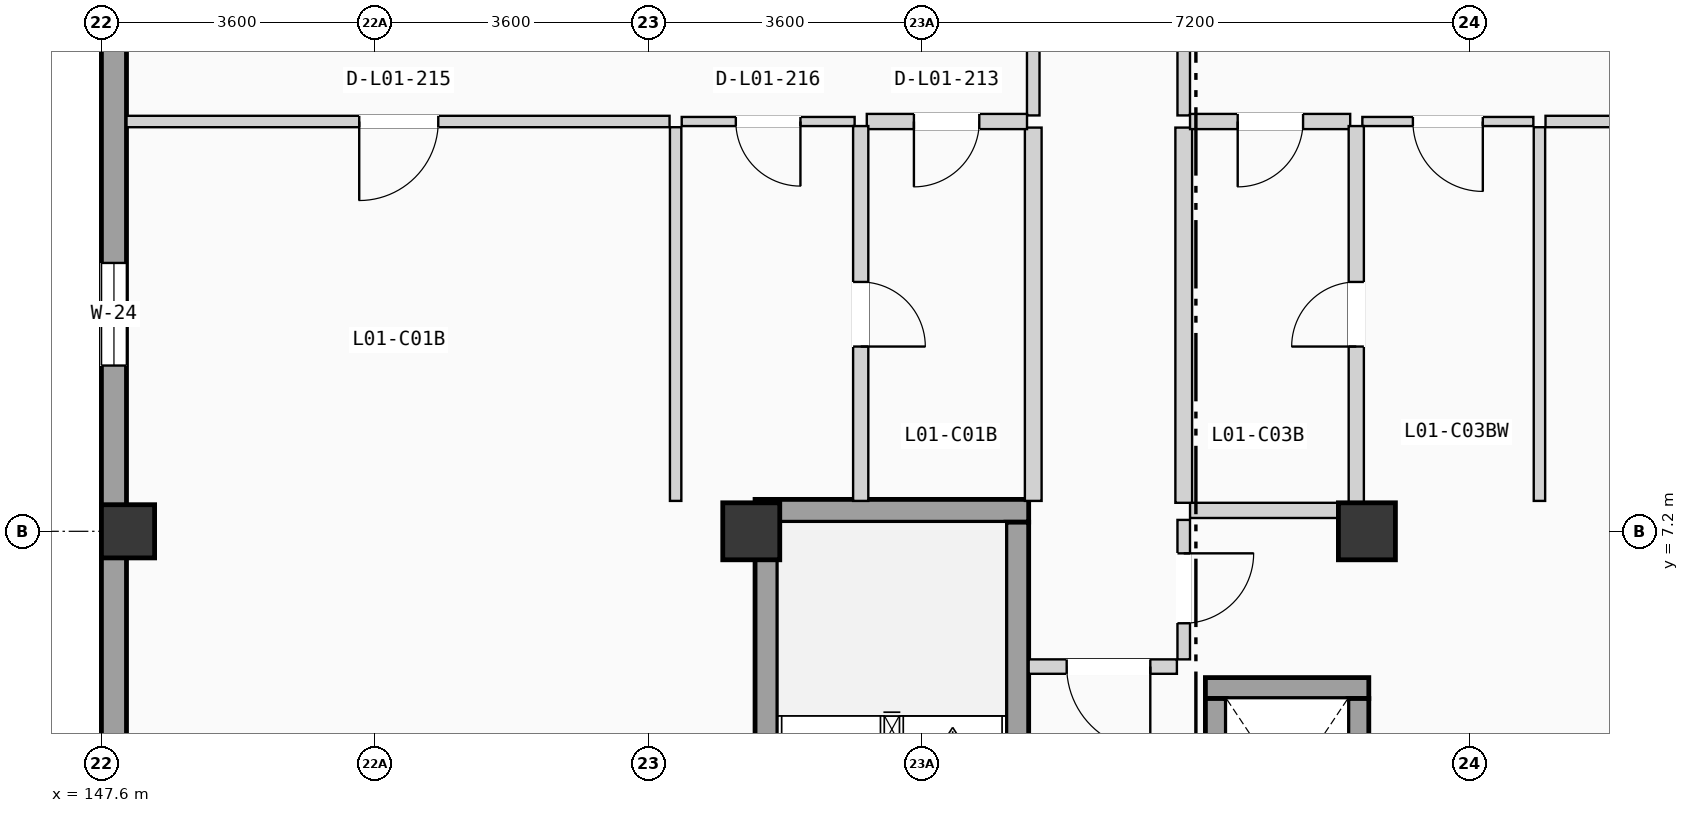
"""IFC4 building model, lengths in metres.
Left out: names, types, materials, properties, quantities, classifications, styles, units other than length and angle.
Written with IfcOpenShell. Run it as: python <this file> out.ifc"""

import sys

from ifc_helpers import new_model, si_unit, direction, frame, frame_2d, origin, origin_2d, place, context, subcontext, project, spatial, rectangle, extrude, element, fill, save


model = new_model("IFC4")
c1 = context("Model", 3, precision=1e-05, world=origin(), true_north=direction((0.0, 1.0)))
c2 = subcontext(c1, "Body", "Model", "MODEL_VIEW")
j1 = project(units=[si_unit("LENGTHUNIT", "METRE"), si_unit("PLANEANGLEUNIT", "RADIAN")], contexts=[c1])
p1 = place(None, origin())
s1 = spatial("IfcSite", under=j1, at=p1, CompositionType="ELEMENT")
p2 = place(p1, origin())
s2 = spatial("IfcBuilding", under=s1, at=p2, CompositionType="ELEMENT")
p3 = place(p2, frame((0.0, 0.0, 4.9)))
s3 = spatial("IfcBuildingStorey", under=s2, at=p3, CompositionType="ELEMENT", Elevation=4.9)
p4 = place(p3, frame((147.95, 7.2, 0.0), z_axis=(0.0, 0.0, 1.0), x_axis=(1.0, 0.0, 0.0)))
e1 = element("IfcColumn", 1, at=p4, inside=s3, PredefinedType="COLUMN", context=c2, shape_type="SweptSolid", body=[
    extrude(rectangle(XDim=0.7, YDim=0.7, at=origin_2d()), origin(), (0.0, 0.0, 1.0), 3.675),
])
for number, where, z_axis, x_axis in (
    (2, (156.15, 7.2, 0.0), (0.0, 0.0, 1.0), (1.0, 0.0, 0.0)),
    (3, (164.25, 7.2, 0.0), (0.0, 0.0, 1.0), (1.0, 0.0, 0.0)),
):
    element("IfcColumn", number, at=place(p3, frame(where, z_axis=z_axis, x_axis=x_axis)), inside=s3, PredefinedType="COLUMN", context=c2, shape_type="SweptSolid", body=[
        extrude(rectangle(XDim=0.75, YDim=0.75, at=origin_2d()), origin(), (0.0, 0.0, 1.0), 3.675),
    ])
p5 = place(p3, frame((147.765, 0.33, 0.0), z_axis=(0.0, 0.0, 1.0), x_axis=(0.0, 1.0, 0.0)))
e4 = element("IfcWall", 4, at=p5, inside=s3, PredefinedType="SOLIDWALL", context=c2, shape_type="SweptSolid", body=[
    extrude(rectangle(XDim=49.74, YDim=0.33, at=frame_2d((24.87, 0.0))), origin(), (0.0, 0.0, 1.0), 3.415),
])
p6 = place(p5, frame((15.645, 0.0, 0.9)))
e5 = element("IfcOpeningElement", 5, at=p6, cuts=e4, PredefinedType="OPENING", context=c2, shape_type="SweptSolid", body=[
    extrude(rectangle(XDim=1.35, YDim=1.5, at=frame_2d((0.675, 0.75))), frame((0.0, 0.175, 0.0), z_axis=(0.0, -1.0, 0.0), x_axis=(1.0, 0.0, 0.0)), (0.0, 0.0, 1.0), 0.35),
])
p7 = place(p5, frame((9.051, 0.0, 0.9)))
e6 = element("IfcOpeningElement", 6, at=p7, cuts=e4, PredefinedType="OPENING", context=c2, shape_type="SweptSolid", body=[
    extrude(rectangle(XDim=1.35, YDim=1.65, at=frame_2d((0.675, 0.825))), frame((0.0, 0.175, 0.0), z_axis=(0.0, -1.0, 0.0), x_axis=(1.0, 0.0, 0.0)), (0.0, 0.0, 1.0), 0.35),
])
p8 = place(p5, frame((19.055, 0.0, 0.9)))
e7 = element("IfcOpeningElement", 7, at=p8, cuts=e4, PredefinedType="OPENING", context=c2, shape_type="SweptSolid", body=[
    extrude(rectangle(XDim=1.35, YDim=1.8, at=frame_2d((0.675, 0.9))), frame((0.0, 0.175, 0.0), z_axis=(0.0, -1.0, 0.0), x_axis=(1.0, 0.0, 0.0)), (0.0, 0.0, 1.0), 0.35),
])
p9 = place(p5, frame((31.351, 0.0, 0.9)))
e8 = element("IfcOpeningElement", 8, at=p9, cuts=e4, PredefinedType="OPENING", context=c2, shape_type="SweptSolid", body=[
    extrude(rectangle(XDim=1.48, YDim=1.2, at=frame_2d((0.74, 0.6))), frame((0.0, 0.175, 0.0), z_axis=(0.0, -1.0, 0.0), x_axis=(1.0, 0.0, 0.0)), (0.0, 0.0, 1.0), 0.35),
])
p10 = place(p5, frame((25.136, 0.0, 0.9)))
e9 = element("IfcOpeningElement", 9, at=p10, cuts=e4, PredefinedType="OPENING", context=c2, shape_type="SweptSolid", body=[
    extrude(rectangle(XDim=1.48, YDim=1.35, at=frame_2d((0.74, 0.675))), frame((0.0, 0.175, 0.0), z_axis=(0.0, -1.0, 0.0), x_axis=(1.0, 0.0, 0.0)), (0.0, 0.0, 1.0), 0.35),
])
p11 = place(p5, frame((38.465, 0.0, 0.9)))
e10 = element("IfcOpeningElement", 10, at=p11, cuts=e4, PredefinedType="OPENING", context=c2, shape_type="SweptSolid", body=[
    extrude(rectangle(XDim=1.48, YDim=1.5, at=frame_2d((0.74, 0.75))), frame((0.0, 0.175, 0.0), z_axis=(0.0, -1.0, 0.0), x_axis=(1.0, 0.0, 0.0)), (0.0, 0.0, 1.0), 0.35),
])
p12 = place(p3, frame((156.2, 7.47, 0.0), z_axis=(0.0, 0.0, 1.0), x_axis=(1.0, 0.0, 0.0)))
e11 = element("IfcWall", 11, at=p12, inside=s3, PredefinedType="SHEAR", context=c2, shape_type="SweptSolid", body=[
    extrude(rectangle(XDim=3.6, YDim=0.3, at=frame_2d((1.8, 0.0))), origin(), (0.0, 0.0, 1.0), 3.415),
])
p13 = place(p3, frame((156.35, 0.32, 0.0), z_axis=(0.0, 0.0, 1.0), x_axis=(0.0, 1.0, 0.0)))
e12 = element("IfcWall", 12, at=p13, inside=s3, PredefinedType="SHEAR", context=c2, shape_type="SweptSolid", body=[
    extrude(rectangle(XDim=7.0, YDim=0.3, at=frame_2d((3.5, 0.0))), origin(), (0.0, 0.0, 1.0), 3.415),
])
p14 = place(p3, frame((159.65, 0.32, 0.0), z_axis=(0.0, 0.0, 1.0), x_axis=(0.0, 1.0, 0.0)))
e13 = element("IfcWall", 13, at=p14, inside=s3, PredefinedType="SHEAR", context=c2, shape_type="SweptSolid", body=[
    extrude(rectangle(XDim=7.0, YDim=0.3, at=frame_2d((3.5, 0.0))), origin(), (0.0, 0.0, 1.0), 3.415),
])
p15 = place(p14, frame((0.225, 0.0, 0.0)))
e14 = element("IfcOpeningElement", 14, at=p15, cuts=e13, PredefinedType="OPENING", context=c2, shape_type="SweptSolid", body=[
    extrude(rectangle(XDim=1.15, YDim=2.12, at=frame_2d((0.575, 1.06))), frame((0.0, 0.16, 0.0), z_axis=(0.0, -1.0, 0.0), x_axis=(1.0, 0.0, 0.0)), (0.0, 0.0, 1.0), 0.32),
])
p16 = place(p3, frame((162.125, 5.137, 0.0), z_axis=(0.0, 0.0, 1.0), x_axis=(1.0, 0.0, 0.0)))
e15 = element("IfcWall", 15, at=p16, inside=s3, PredefinedType="SHEAR", context=c2, shape_type="SweptSolid", body=[
    extrude(rectangle(XDim=2.15, YDim=0.275, at=frame_2d((1.075, 0.0))), origin(), (0.0, 0.0, 1.0), 3.415),
])
p17 = place(p3, frame((162.262, 2.6, 0.0), z_axis=(0.0, 0.0, 1.0), x_axis=(0.0, 1.0, 0.0)))
e16 = element("IfcWall", 16, at=p17, inside=s3, PredefinedType="SHEAR", context=c2, shape_type="SweptSolid", body=[
    extrude(rectangle(XDim=2.4, YDim=0.275, at=frame_2d((1.2, 0.0))), origin(), (0.0, 0.0, 1.0), 3.415),
])
p18 = place(p17, frame((0.65, 0.0, 0.0)))
e17 = element("IfcOpeningElement", 17, at=p18, cuts=e16, PredefinedType="OPENING", context=c2, shape_type="SweptSolid", body=[
    extrude(rectangle(XDim=1.1, YDim=2.15, at=frame_2d((0.55, 1.075))), frame((0.0, 0.147, 0.0), z_axis=(0.0, -1.0, 0.0), x_axis=(1.0, 0.0, 0.0)), (0.0, 0.0, 1.0), 0.295),
])
p19 = place(p3, frame((164.137, 2.6, 0.0), z_axis=(0.0, 0.0, 1.0), x_axis=(0.0, 1.0, 0.0)))
e18 = element("IfcWall", 18, at=p19, inside=s3, PredefinedType="SHEAR", context=c2, shape_type="SweptSolid", body=[
    extrude(rectangle(XDim=2.4, YDim=0.275, at=frame_2d((1.2, 0.0))), origin(), (0.0, 0.0, 1.0), 3.415),
])
p20 = place(p3, frame((159.8, 5.42, 0.0), z_axis=(0.0, 0.0, 1.0), x_axis=(1.0, 0.0, 0.0)))
e19 = element("IfcWall", 19, at=p20, inside=s3, PredefinedType="PARTITIONING", context=c2, shape_type="SweptSolid", body=[
    extrude(rectangle(XDim=1.95, YDim=0.19, at=frame_2d((0.975, 0.0))), origin(), (0.0, 0.0, 1.0), 3.395),
])
p21 = place(p20, frame((0.5, 0.0, 0.0)))
e20 = element("IfcOpeningElement", 20, at=p21, cuts=e19, PredefinedType="OPENING", context=c2, shape_type="SweptSolid", body=[
    extrude(rectangle(XDim=1.1, YDim=2.12, at=frame_2d((0.55, 1.06))), frame((0.0, 0.105, 0.0), z_axis=(0.0, -1.0, 0.0), x_axis=(1.0, 0.0, 0.0)), (0.0, 0.0, 1.0), 0.21),
])
p22 = place(p3, frame((161.84, 5.515, 0.0), z_axis=(0.0, 0.0, 1.0), x_axis=(0.0, 1.0, 0.0)))
e21 = element("IfcWall", 21, at=p22, inside=s3, PredefinedType="PARTITIONING", context=c2, shape_type="SweptSolid", body=[
    extrude(rectangle(XDim=1.835, YDim=0.165, at=frame_2d((0.917, 0.0))), origin(), (0.0, 0.0, 1.0), 3.395),
])
p23 = place(p22, frame((0.475, 0.0, 0.0)))
e22 = element("IfcOpeningElement", 22, at=p23, cuts=e21, PredefinedType="OPENING", context=c2, shape_type="SweptSolid", body=[
    extrude(rectangle(XDim=0.92, YDim=2.04, at=frame_2d((0.46, 1.02))), frame((0.0, 0.093, 0.0), z_axis=(0.0, -1.0, 0.0), x_axis=(1.0, 0.0, 0.0)), (0.0, 0.0, 1.0), 0.185),
])
p24 = place(p3, frame((161.923, 7.475, 0.0), z_axis=(0.0, 0.0, 1.0), x_axis=(1.0, 0.0, 0.0)))
e23 = element("IfcWall", 23, at=p24, inside=s3, PredefinedType="PLUMBINGWALL", context=c2, shape_type="SweptSolid", body=[
    extrude(rectangle(XDim=2.107, YDim=0.2, at=frame_2d((1.053, 0.0))), origin(), (0.0, 0.0, 1.0), 3.395),
])
p25 = place(p3, frame((159.86, 12.672, 0.0), z_axis=(0.0, 0.0, 1.0), x_axis=(0.0, 1.0, 0.0)))
e24 = element("IfcWall", 24, at=p25, inside=s3, PredefinedType="PARTITIONING", context=c2, shape_type="SweptSolid", body=[
    extrude(rectangle(XDim=5.958, YDim=0.165, at=frame_2d((2.979, 0.0))), origin(), (0.0, 0.0, 1.0), 3.395),
])
p26 = place(p25, frame((2.454, 0.0, 0.0)))
e25 = element("IfcOpeningElement", 25, at=p26, cuts=e24, PredefinedType="OPENING", context=c2, shape_type="SweptSolid", body=[
    extrude(rectangle(XDim=1.05, YDim=2.13, at=frame_2d((0.525, 1.065))), frame((0.0, 0.093, 0.0), z_axis=(0.0, -1.0, 0.0), x_axis=(1.0, 0.0, 0.0)), (0.0, 0.0, 1.0), 0.185),
])
p27 = place(p3, frame((159.86, 7.6, 0.0), z_axis=(0.0, 0.0, 1.0), x_axis=(0.0, 1.0, 0.0)))
e26 = element("IfcWall", 26, at=p27, inside=s3, PredefinedType="PLUMBINGWALL", context=c2, shape_type="SweptSolid", body=[
    extrude(rectangle(XDim=4.912, YDim=0.22, at=frame_2d((2.456, 0.0))), origin(), (0.0, 0.0, 1.0), 3.395),
])
p28 = place(p3, frame((161.84, 12.672, 0.0), z_axis=(0.0, 0.0, 1.0), x_axis=(0.0, 1.0, 0.0)))
e27 = element("IfcWall", 27, at=p28, inside=s3, PredefinedType="PARTITIONING", context=c2, shape_type="SweptSolid", body=[
    extrude(rectangle(XDim=5.958, YDim=0.165, at=frame_2d((2.979, 0.0))), origin(), (0.0, 0.0, 1.0), 3.395),
])
p29 = place(p28, frame((2.454, 0.0, 0.0)))
e28 = element("IfcOpeningElement", 28, at=p29, cuts=e27, PredefinedType="OPENING", context=c2, shape_type="SweptSolid", body=[
    extrude(rectangle(XDim=1.05, YDim=2.13, at=frame_2d((0.525, 1.065))), frame((0.0, 0.093, 0.0), z_axis=(0.0, -1.0, 0.0), x_axis=(1.0, 0.0, 0.0)), (0.0, 0.0, 1.0), 0.185),
])
p30 = place(p3, frame((161.84, 7.575, 0.0), z_axis=(0.0, 0.0, 1.0), x_axis=(0.0, 1.0, 0.0)))
e29 = element("IfcWall", 29, at=p30, inside=s3, PredefinedType="PLUMBINGWALL", context=c2, shape_type="SweptSolid", body=[
    extrude(rectangle(XDim=4.937, YDim=0.22, at=frame_2d((2.469, 0.0))), origin(), (0.0, 0.0, 1.0), 3.395),
])
p31 = place(p3, frame((157.67, 12.592, 0.0), z_axis=(0.0, 0.0, 1.0), x_axis=(1.0, 0.0, 0.0)))
e30 = element("IfcWall", 30, at=p31, inside=s3, PredefinedType="PLUMBINGWALL", context=c2, shape_type="SweptSolid", body=[
    extrude(rectangle(XDim=2.108, YDim=0.2, at=frame_2d((1.054, 0.0))), origin(), (0.0, 0.0, 1.0), 3.395),
])
p32 = place(p31, frame((0.62, 0.0, 0.0)))
e31 = element("IfcOpeningElement", 31, at=p32, cuts=e30, PredefinedType="OPENING", context=c2, shape_type="SweptSolid", body=[
    extrude(rectangle(XDim=0.86, YDim=2.0, at=frame_2d((0.43, 1.0))), frame((0.0, 0.11, 0.0), z_axis=(0.0, -1.0, 0.0), x_axis=(1.0, 0.0, 0.0)), (0.0, 0.0, 1.0), 0.22),
])
p33 = place(p3, frame((147.93, 12.592, 0.0), z_axis=(0.0, 0.0, 1.0), x_axis=(1.0, 0.0, 0.0)))
e32 = element("IfcWall", 32, at=p33, inside=s3, PredefinedType="PARTITIONING", context=c2, shape_type="SweptSolid", body=[
    extrude(rectangle(XDim=7.145, YDim=0.15, at=frame_2d((3.573, 0.0))), origin(), (0.0, 0.0, 1.0), 3.395),
])
p34 = place(p33, frame((3.062, 0.0, 0.0)))
e33 = element("IfcOpeningElement", 33, at=p34, cuts=e32, PredefinedType="OPENING", context=c2, shape_type="SweptSolid", body=[
    extrude(rectangle(XDim=1.04, YDim=2.08, at=frame_2d((0.52, 1.04))), frame((0.0, 0.085, 0.0), z_axis=(0.0, -1.0, 0.0), x_axis=(1.0, 0.0, 0.0)), (0.0, 0.0, 1.0), 0.17),
])
p35 = place(p3, frame((155.235, 12.592, 0.0), z_axis=(0.0, 0.0, 1.0), x_axis=(1.0, 0.0, 0.0)))
e34 = element("IfcWall", 34, at=p35, inside=s3, PredefinedType="PARTITIONING", context=c2, shape_type="SweptSolid", body=[
    extrude(rectangle(XDim=2.275, YDim=0.12, at=frame_2d((1.137, 0.0))), origin(), (0.0, 0.0, 1.0), 3.395),
])
p36 = place(p35, frame((0.712, 0.0, 0.0)))
e35 = element("IfcOpeningElement", 35, at=p36, cuts=e34, PredefinedType="OPENING", context=c2, shape_type="SweptSolid", body=[
    extrude(rectangle(XDim=0.85, YDim=2.01, at=frame_2d((0.425, 1.005))), frame((0.0, 0.07, 0.0), z_axis=(0.0, -1.0, 0.0), x_axis=(1.0, 0.0, 0.0)), (0.0, 0.0, 1.0), 0.14),
])
p37 = place(p3, frame((157.59, 7.6, 0.0), z_axis=(0.0, 0.0, 1.0), x_axis=(0.0, 1.0, 0.0)))
e36 = element("IfcWall", 36, at=p37, inside=s3, PredefinedType="PLUMBINGWALL", context=c2, shape_type="SweptSolid", body=[
    extrude(rectangle(XDim=4.932, YDim=0.2, at=frame_2d((2.466, 0.0))), origin(), (0.0, 0.0, 1.0), 3.395),
])
p38 = place(p37, frame((2.031, 0.0, 0.0)))
e37 = element("IfcOpeningElement", 37, at=p38, cuts=e36, PredefinedType="OPENING", context=c2, shape_type="SweptSolid", body=[
    extrude(rectangle(XDim=0.85, YDim=2.01, at=frame_2d((0.425, 1.005))), frame((0.0, 0.11, 0.0), z_axis=(0.0, -1.0, 0.0), x_axis=(1.0, 0.0, 0.0)), (0.0, 0.0, 1.0), 0.22),
])
p39 = place(p3, frame((155.155, 7.6, 0.0), z_axis=(0.0, 0.0, 1.0), x_axis=(0.0, 1.0, 0.0)))
e38 = element("IfcWall", 38, at=p39, inside=s3, PredefinedType="PARTITIONING", context=c2, shape_type="SweptSolid", body=[
    extrude(rectangle(XDim=4.917, YDim=0.15, at=frame_2d((2.458, 0.0))), origin(), (0.0, 0.0, 1.0), 3.395),
])
p40 = place(p3, frame((161.923, 12.592, 0.0), z_axis=(0.0, 0.0, 1.0), x_axis=(1.0, 0.0, 0.0)))
e39 = element("IfcWall", 39, at=p40, inside=s3, PredefinedType="PLUMBINGWALL", context=c2, shape_type="SweptSolid", body=[
    extrude(rectangle(XDim=2.107, YDim=0.2, at=frame_2d((1.053, 0.0))), origin(), (0.0, 0.0, 1.0), 3.395),
])
p41 = place(p40, frame((0.627, 0.0, 0.0)))
e40 = element("IfcOpeningElement", 40, at=p41, cuts=e39, PredefinedType="OPENING", context=c2, shape_type="SweptSolid", body=[
    extrude(rectangle(XDim=0.86, YDim=2.0, at=frame_2d((0.43, 1.0))), frame((0.0, 0.11, 0.0), z_axis=(0.0, -1.0, 0.0), x_axis=(1.0, 0.0, 0.0)), (0.0, 0.0, 1.0), 0.22),
])
p42 = place(p3, frame((166.6, 12.592, 0.0), z_axis=(0.0, 0.0, 1.0), x_axis=(1.0, 0.0, 0.0)))
e41 = element("IfcWall", 41, at=p42, inside=s3, PredefinedType="PARTITIONING", context=c2, shape_type="SweptSolid", body=[
    extrude(rectangle(XDim=5.87, YDim=0.15, at=frame_2d((2.935, 0.0))), origin(), (0.0, 0.0, 1.0), 3.395),
])
p43 = place(p42, frame((2.455, 0.0, 0.0)))
e42 = element("IfcOpeningElement", 42, at=p43, cuts=e41, PredefinedType="OPENING", context=c2, shape_type="SweptSolid", body=[
    extrude(rectangle(XDim=0.94, YDim=2.06, at=frame_2d((0.47, 1.03))), frame((0.0, 0.085, 0.0), z_axis=(0.0, -1.0, 0.0), x_axis=(1.0, 0.0, 0.0)), (0.0, 0.0, 1.0), 0.17),
])
p44 = place(p3, frame((164.19, 12.592, 0.0), z_axis=(0.0, 0.0, 1.0), x_axis=(1.0, 0.0, 0.0)))
e43 = element("IfcWall", 43, at=p44, inside=s3, PredefinedType="PARTITIONING", context=c2, shape_type="SweptSolid", body=[
    extrude(rectangle(XDim=2.25, YDim=0.12, at=frame_2d((1.125, 0.0))), origin(), (0.0, 0.0, 1.0), 3.395),
])
p45 = place(p44, frame((0.665, 0.0, 0.0)))
e44 = element("IfcOpeningElement", 44, at=p45, cuts=e43, PredefinedType="OPENING", context=c2, shape_type="SweptSolid", body=[
    extrude(rectangle(XDim=0.92, YDim=2.02, at=frame_2d((0.46, 1.01))), frame((0.0, 0.07, 0.0), z_axis=(0.0, -1.0, 0.0), x_axis=(1.0, 0.0, 0.0)), (0.0, 0.0, 1.0), 0.14),
])
p46 = place(p3, frame((164.11, 7.575, 0.0), z_axis=(0.0, 0.0, 1.0), x_axis=(0.0, 1.0, 0.0)))
e45 = element("IfcWall", 45, at=p46, inside=s3, PredefinedType="PLUMBINGWALL", context=c2, shape_type="SweptSolid", body=[
    extrude(rectangle(XDim=4.957, YDim=0.2, at=frame_2d((2.479, 0.0))), origin(), (0.0, 0.0, 1.0), 3.395),
])
p47 = place(p46, frame((2.056, 0.0, 0.0)))
e46 = element("IfcOpeningElement", 46, at=p47, cuts=e45, PredefinedType="OPENING", context=c2, shape_type="SweptSolid", body=[
    extrude(rectangle(XDim=0.85, YDim=2.01, at=frame_2d((0.425, 1.005))), frame((0.0, 0.11, 0.0), z_axis=(0.0, -1.0, 0.0), x_axis=(1.0, 0.0, 0.0)), (0.0, 0.0, 1.0), 0.22),
])
p48 = place(p3, frame((166.52, 7.6, 0.0), z_axis=(0.0, 0.0, 1.0), x_axis=(0.0, 1.0, 0.0)))
e47 = element("IfcWall", 47, at=p48, inside=s3, PredefinedType="PARTITIONING", context=c2, shape_type="SweptSolid", body=[
    extrude(rectangle(XDim=4.917, YDim=0.15, at=frame_2d((2.458, 0.0))), origin(), (0.0, 0.0, 1.0), 3.395),
])
p49 = place(p7, origin())
e48 = element("IfcWindow", 48, at=p49, inside=s3, PartitioningType="SINGLE_PANEL", PredefinedType="WINDOW", context=c2, shape_type="SweptSolid", body=[
    extrude(rectangle(XDim=1.35, YDim=1.65, at=frame_2d((0.675, 0.825))), frame((0.0, 0.03, 0.0), z_axis=(0.0, -1.0, 0.0), x_axis=(1.0, 0.0, 0.0)), (0.0, 0.0, 1.0), 0.06),
])
fill(e6, e48)
p50 = place(p21, frame((1.1, 0.0, 0.0), z_axis=(0.0, 0.0, 1.0), x_axis=(-1.0, 0.0, 0.0)))
e49 = element("IfcDoor", 49, at=p50, inside=s3, OperationType="SINGLE_SWING_RIGHT", PredefinedType="DOOR", context=c2, shape_type="SweptSolid", body=[
    extrude(rectangle(XDim=1.1, YDim=2.12, at=frame_2d((0.55, 1.06))), frame((0.0, 0.025, 0.0), z_axis=(0.0, -1.0, 0.0), x_axis=(1.0, 0.0, 0.0)), (0.0, 0.0, 1.0), 0.05),
])
fill(e20, e49)
p51 = place(p23, frame((0.92, 0.0, 0.0), z_axis=(0.0, 0.0, 1.0), x_axis=(-1.0, 0.0, 0.0)))
e50 = element("IfcDoor", 50, at=p51, inside=s3, OperationType="SINGLE_SWING_RIGHT", PredefinedType="DOOR", context=c2, shape_type="SweptSolid", body=[
    extrude(rectangle(XDim=0.92, YDim=2.04, at=frame_2d((0.46, 1.02))), frame((0.0, 0.025, 0.0), z_axis=(0.0, -1.0, 0.0), x_axis=(1.0, 0.0, 0.0)), (0.0, 0.0, 1.0), 0.05),
])
fill(e22, e50)
p52 = place(p32, frame((0.86, 0.0, 0.0), z_axis=(0.0, 0.0, 1.0), x_axis=(-1.0, 0.0, 0.0)))
e51 = element("IfcDoor", 51, at=p52, inside=s3, OperationType="SINGLE_SWING_LEFT", PredefinedType="DOOR", context=c2, shape_type="SweptSolid", body=[
    extrude(rectangle(XDim=0.86, YDim=2.0, at=frame_2d((0.43, 1.0))), frame((0.0, 0.025, 0.0), z_axis=(0.0, -1.0, 0.0), x_axis=(1.0, 0.0, 0.0)), (0.0, 0.0, 1.0), 0.05),
])
fill(e31, e51)
p53 = place(p34, frame((1.04, 0.0, 0.0), z_axis=(0.0, 0.0, 1.0), x_axis=(-1.0, 0.0, 0.0)))
e52 = element("IfcDoor", 52, at=p53, inside=s3, OperationType="SINGLE_SWING_LEFT", PredefinedType="DOOR", context=c2, shape_type="SweptSolid", body=[
    extrude(rectangle(XDim=1.04, YDim=2.08, at=frame_2d((0.52, 1.04))), frame((0.0, 0.025, 0.0), z_axis=(0.0, -1.0, 0.0), x_axis=(1.0, 0.0, 0.0)), (0.0, 0.0, 1.0), 0.05),
])
fill(e33, e52)
p54 = place(p36, frame((0.85, 0.0, 0.0), z_axis=(0.0, 0.0, 1.0), x_axis=(-1.0, 0.0, 0.0)))
e53 = element("IfcDoor", 53, at=p54, inside=s3, OperationType="SINGLE_SWING_RIGHT", PredefinedType="DOOR", context=c2, shape_type="SweptSolid", body=[
    extrude(rectangle(XDim=0.85, YDim=2.01, at=frame_2d((0.425, 1.005))), frame((0.0, 0.025, 0.0), z_axis=(0.0, -1.0, 0.0), x_axis=(1.0, 0.0, 0.0)), (0.0, 0.0, 1.0), 0.05),
])
fill(e35, e53)
p55 = place(p38, frame((0.85, 0.0, 0.0), z_axis=(0.0, 0.0, 1.0), x_axis=(-1.0, 0.0, 0.0)))
e54 = element("IfcDoor", 54, at=p55, inside=s3, OperationType="SINGLE_SWING_LEFT", PredefinedType="DOOR", context=c2, shape_type="SweptSolid", body=[
    extrude(rectangle(XDim=0.85, YDim=2.01, at=frame_2d((0.425, 1.005))), frame((0.0, 0.025, 0.0), z_axis=(0.0, -1.0, 0.0), x_axis=(1.0, 0.0, 0.0)), (0.0, 0.0, 1.0), 0.05),
])
fill(e37, e54)
p56 = place(p41, frame((0.86, 0.0, 0.0), z_axis=(0.0, 0.0, 1.0), x_axis=(-1.0, 0.0, 0.0)))
e55 = element("IfcDoor", 55, at=p56, inside=s3, OperationType="SINGLE_SWING_LEFT", PredefinedType="DOOR", context=c2, shape_type="SweptSolid", body=[
    extrude(rectangle(XDim=0.86, YDim=2.0, at=frame_2d((0.43, 1.0))), frame((0.0, 0.025, 0.0), z_axis=(0.0, -1.0, 0.0), x_axis=(1.0, 0.0, 0.0)), (0.0, 0.0, 1.0), 0.05),
])
fill(e40, e55)
p57 = place(p45, frame((0.92, 0.0, 0.0), z_axis=(0.0, 0.0, 1.0), x_axis=(-1.0, 0.0, 0.0)))
e56 = element("IfcDoor", 56, at=p57, inside=s3, OperationType="SINGLE_SWING_RIGHT", PredefinedType="DOOR", context=c2, shape_type="SweptSolid", body=[
    extrude(rectangle(XDim=0.92, YDim=2.02, at=frame_2d((0.46, 1.01))), frame((0.0, 0.025, 0.0), z_axis=(0.0, -1.0, 0.0), x_axis=(1.0, 0.0, 0.0)), (0.0, 0.0, 1.0), 0.05),
])
fill(e44, e56)
p58 = place(p47, origin())
e57 = element("IfcDoor", 57, at=p58, inside=s3, OperationType="SINGLE_SWING_LEFT", PredefinedType="DOOR", context=c2, shape_type="SweptSolid", body=[
    extrude(rectangle(XDim=0.85, YDim=2.01, at=frame_2d((0.425, 1.005))), frame((0.0, 0.025, 0.0), z_axis=(0.0, -1.0, 0.0), x_axis=(1.0, 0.0, 0.0)), (0.0, 0.0, 1.0), 0.05),
])
fill(e46, e57)
save(model, sys.argv[1])
